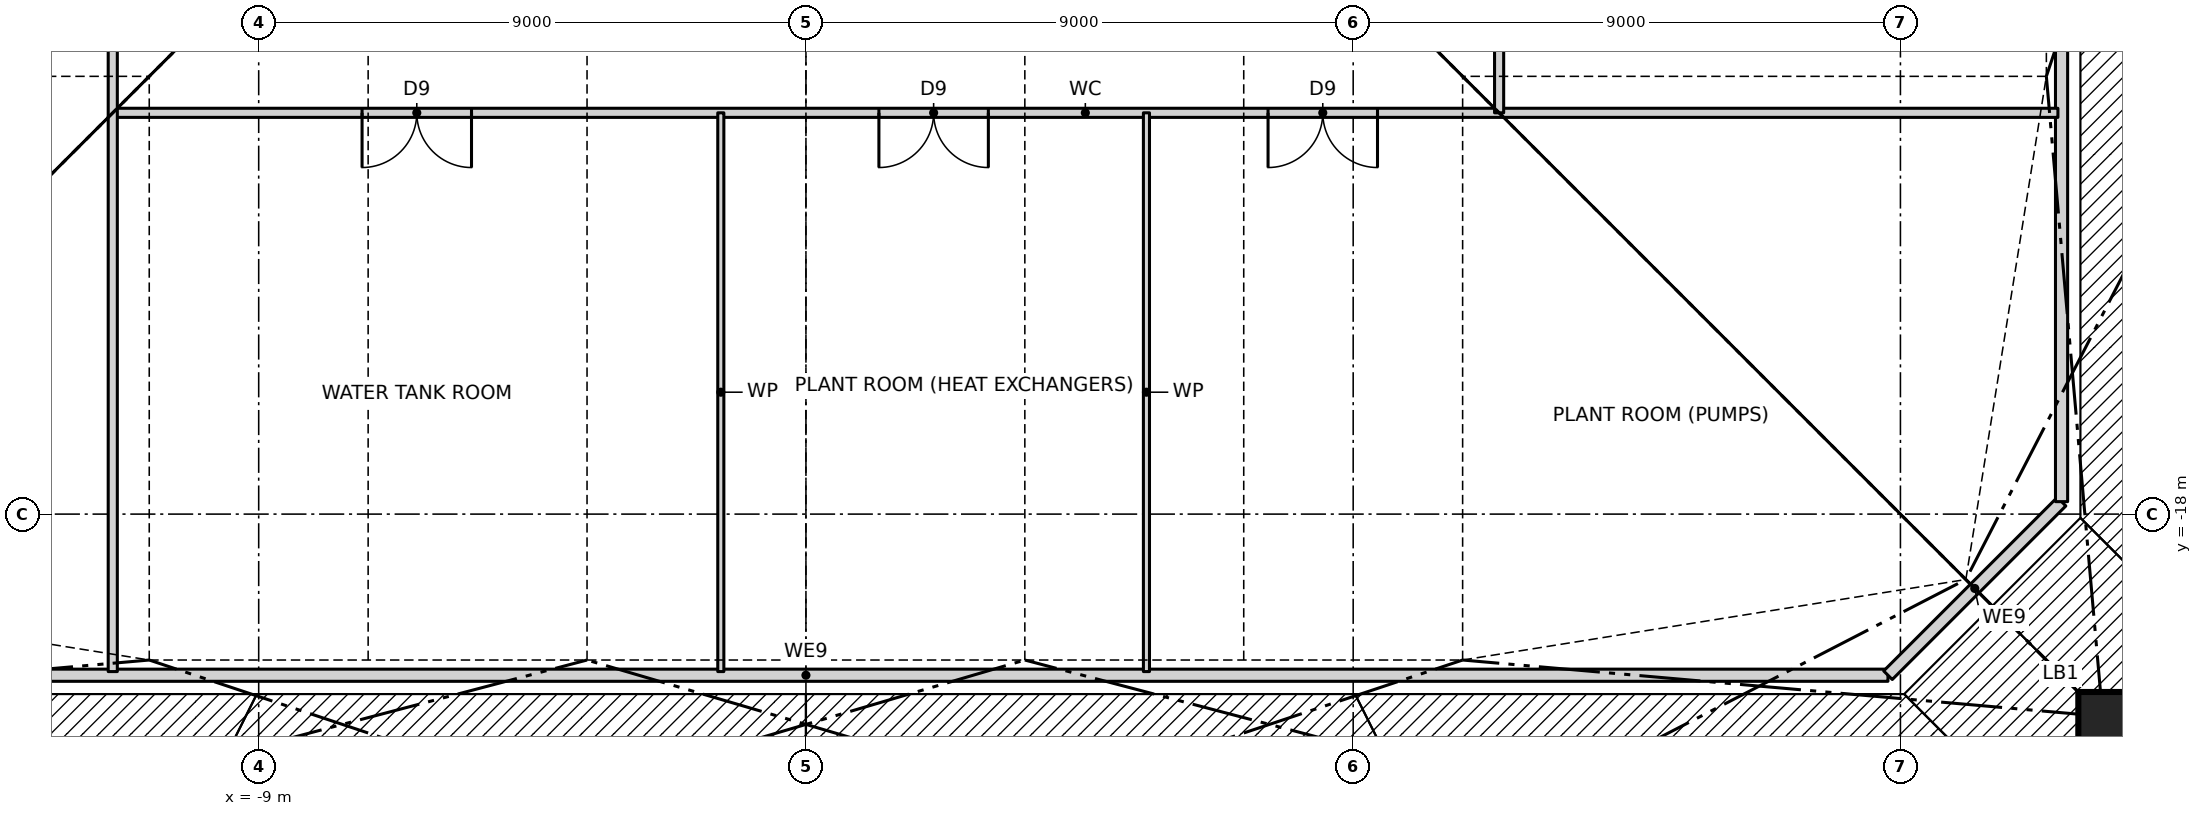
"""IFC4 building model, lengths in metres.
Left out: names, types, materials, properties, quantities, classifications, styles, units other than length and angle.
Written with IfcOpenShell. Run it as: python <this file> out.ifc"""

import sys

from ifc_helpers import new_model, si_unit, direction, frame, frame_2d, origin, origin_2d, place, context, subcontext, project, spatial, rectangle, hollow_rectangle, extrude, clip, halfspace, element, fill, save


model = new_model("IFC4")
c1 = context("Model", 3, precision=1e-05, world=origin(), true_north=direction((0.0, 1.0)))
c2 = subcontext(c1, "Body", "Model", "MODEL_VIEW")
j1 = project(units=[si_unit("LENGTHUNIT", "METRE"), si_unit("PLANEANGLEUNIT", "RADIAN")], contexts=[c1])
p1 = place(None, origin())
s1 = spatial("IfcSite", under=j1, at=p1, CompositionType="ELEMENT")
p2 = place(p1, origin())
s2 = spatial("IfcBuilding", under=s1, at=p2, CompositionType="ELEMENT")
p3 = place(p2, frame((0.0, 0.0, 74.5)))
s3 = spatial("IfcBuildingStorey", under=s2, at=p3, CompositionType="ELEMENT", Elevation=74.5)
p4 = place(p3, frame((-12.15, -22.65, 0.0), z_axis=(0.206127500627, 0.343583115532, 0.91622164142), x_axis=(-0.857517554715, 0.514454704863, 0.0)))
e1 = element("IfcColumn", 1, at=p4, inside=s3, PredefinedType="COLUMN", context=c2, shape_type="Clipping", body=[
    clip(clip(extrude(hollow_rectangle(XDim=0.8, YDim=0.8, WallThickness=0.09, at=origin_2d()), origin(), (0.0, 0.0, 1.0), 6.549), halfspace(frame((0.0, 0.0, 0.0), z_axis=(0.0, -0.400671815572, -0.91622164142), x_axis=(-0.857517554715, -0.471354534126, 0.206127500627)), False)), halfspace(frame((0.0, 2.404, 5.497), z_axis=(0.0, 0.400671815572, 0.91622164142), x_axis=(-0.857517554715, -0.471354534126, 0.206127500627)), False)),
])
p5 = place(p3, frame((-4.05, -22.65, 0.0), z_axis=(0.070044605522, 0.350261033367, 0.934029422311), x_axis=(-0.980584767795, 0.196095673508, 0.0)))
e2 = element("IfcColumn", 2, at=p5, inside=s3, PredefinedType="COLUMN", context=c2, shape_type="Clipping", body=[
    clip(clip(extrude(hollow_rectangle(XDim=0.8, YDim=0.8, WallThickness=0.09, at=origin_2d()), origin(), (0.0, 0.0, 1.0), 6.424), halfspace(frame((0.0, 0.0, 0.0), z_axis=(0.0, -0.357196078167, -0.934029422311), x_axis=(-0.980584767795, -0.183159128644, 0.070044605522)), False)), halfspace(frame((0.0, 2.143, 5.604), z_axis=(0.0, 0.357196078167, 0.934029422311), x_axis=(-0.980584767795, -0.183159128644, 0.070044605522)), False)),
])
p6 = place(p3, frame((4.05, -22.65, 0.0), z_axis=(-0.070044605522, 0.350261033367, 0.934029422311), x_axis=(-0.980584767795, -0.196095673508, 0.0)))
e3 = element("IfcColumn", 3, at=p6, inside=s3, PredefinedType="COLUMN", context=c2, shape_type="Clipping", body=[
    clip(clip(extrude(hollow_rectangle(XDim=0.8, YDim=0.8, WallThickness=0.09, at=origin_2d()), origin(), (0.0, 0.0, 1.0), 6.424), halfspace(frame((0.0, 0.0, 0.0), z_axis=(0.0, -0.357196078167, -0.934029422311), x_axis=(-0.980584767795, 0.183159128644, -0.070044605522)), False)), halfspace(frame((0.0, 2.143, 5.604), z_axis=(0.0, 0.357196078167, 0.934029422311), x_axis=(-0.980584767795, 0.183159128644, -0.070044605522)), False)),
])
p7 = place(p3, frame((12.15, -22.65, 0.0), z_axis=(-0.206127500627, 0.343583115532, 0.91622164142), x_axis=(-0.857517554715, -0.514454704863, 0.0)))
e4 = element("IfcColumn", 4, at=p7, inside=s3, PredefinedType="COLUMN", context=c2, shape_type="Clipping", body=[
    clip(clip(extrude(hollow_rectangle(XDim=0.8, YDim=0.8, WallThickness=0.09, at=origin_2d()), origin(), (0.0, 0.0, 1.0), 6.549), halfspace(frame((0.0, 0.0, 0.0), z_axis=(0.0, -0.400671815572, -0.91622164142), x_axis=(-0.857517554715, 0.471354534126, -0.206127500627)), False)), halfspace(frame((0.0, 2.404, 5.497), z_axis=(0.0, 0.400671815572, 0.91622164142), x_axis=(-0.857517554715, 0.471354534126, -0.206127500627)), False)),
])
p8 = place(p3, frame((21.326, -21.326, 0.0), z_axis=(-0.331294578225, 0.331294578225, 0.883452208599), x_axis=(-0.707106781187, -0.707106781187, 0.0)))
e5 = element("IfcColumn", 5, at=p8, inside=s3, PredefinedType="COLUMN", context=c2, shape_type="Clipping", body=[
    clip(clip(extrude(hollow_rectangle(XDim=0.8, YDim=0.8, WallThickness=0.18, at=origin_2d()), origin(), (0.0, 0.0, 1.0), 6.792), halfspace(frame((0.0, 0.0, 0.0), z_axis=(0.0, -0.468521285666, -0.883452208599), x_axis=(-0.707106781187, 0.624695047554, -0.331294578225)), False)), halfspace(frame((0.0, 2.811, 5.301), z_axis=(0.0, 0.468521285666, 0.883452208599), x_axis=(-0.707106781187, 0.624695047554, -0.331294578225)), False)),
])
p9 = place(p3, frame((22.65, -12.15, 0.0), z_axis=(-0.343583115532, 0.206127500627, 0.91622164142), x_axis=(-0.514454704863, -0.857517554715, 0.0)))
e6 = element("IfcColumn", 6, at=p9, inside=s3, PredefinedType="COLUMN", context=c2, shape_type="Clipping", body=[
    clip(clip(extrude(hollow_rectangle(XDim=0.8, YDim=0.8, WallThickness=0.09, at=origin_2d()), origin(), (0.0, 0.0, 1.0), 6.549), halfspace(frame((0.0, 0.0, 0.0), z_axis=(0.0, -0.400671815572, -0.91622164142), x_axis=(-0.514454704863, 0.785676141527, -0.343583115532)), False)), halfspace(frame((0.0, 2.404, 5.497), z_axis=(0.0, 0.400671815572, 0.91622164142), x_axis=(-0.514454704863, 0.785676141527, -0.343583115532)), False)),
])
p10 = place(p3, frame((-17.795, -20.65, 0.0), z_axis=(0.0, 0.0, 1.0), x_axis=(1.0, 0.0, 0.0)))
e7 = element("IfcWall", 7, at=p10, inside=s3, PredefinedType="PARTITIONING", context=c2, shape_type="SweptSolid", body=[
    extrude(rectangle(XDim=35.59, YDim=0.2, at=frame_2d((17.795, 0.0))), origin(), (0.0, 0.0, 1.0), 5.7),
])
p11 = place(p3, frame((17.795, -20.65, 0.0), z_axis=(0.0, 0.0, 1.0), x_axis=(0.707106781187, 0.707106781187, 0.0)))
e8 = element("IfcWall", 8, at=p11, inside=s3, PredefinedType="PARTITIONING", context=c2, shape_type="SweptSolid", body=[
    extrude(rectangle(XDim=4.038, YDim=0.2, at=frame_2d((2.019, 0.0))), origin(), (0.0, 0.0, 1.0), 5.7),
])
p12 = place(p3, frame((20.65, -17.795, 0.0), z_axis=(0.0, 0.0, 1.0), x_axis=(0.0, 1.0, 0.0)))
e9 = element("IfcWall", 9, at=p12, inside=s3, PredefinedType="PARTITIONING", context=c2, shape_type="SweptSolid", body=[
    extrude(rectangle(XDim=35.59, YDim=0.2, at=frame_2d((17.795, 0.0))), origin(), (0.0, 0.0, 1.0), 5.7),
])
p13 = place(p3, frame((-11.4, -11.4, 0.0), z_axis=(0.0, 0.0, 1.0), x_axis=(1.0, 0.0, 0.0)))
e10 = element("IfcWall", 10, at=p13, inside=s3, PredefinedType="PARTITIONING", context=c2, shape_type="SweptSolid", body=[
    extrude(rectangle(XDim=31.99, YDim=0.15, at=frame_2d((15.995, 0.0))), origin(), (0.0, 0.0, 1.0), 5.77),
])
p14 = place(p13, frame((4.1, 0.0, 0.0)))
e11 = element("IfcOpeningElement", 11, at=p14, cuts=e10, PredefinedType="OPENING", context=c2, shape_type="SweptSolid", body=[
    extrude(rectangle(XDim=1.8, YDim=2.1, at=frame_2d((0.9, 1.05))), frame((0.0, 0.085, 0.0), z_axis=(0.0, -1.0, 0.0), x_axis=(1.0, 0.0, 0.0)), (0.0, 0.0, 1.0), 0.17),
])
p15 = place(p13, frame((12.6, 0.0, 0.0)))
e12 = element("IfcOpeningElement", 12, at=p15, cuts=e10, PredefinedType="OPENING", context=c2, shape_type="SweptSolid", body=[
    extrude(rectangle(XDim=1.8, YDim=2.1, at=frame_2d((0.9, 1.05))), frame((0.0, 0.085, 0.0), z_axis=(0.0, -1.0, 0.0), x_axis=(1.0, 0.0, 0.0)), (0.0, 0.0, 1.0), 0.17),
])
p16 = place(p13, frame((19.0, 0.0, 0.0)))
e13 = element("IfcOpeningElement", 13, at=p16, cuts=e10, PredefinedType="OPENING", context=c2, shape_type="SweptSolid", body=[
    extrude(rectangle(XDim=1.8, YDim=2.1, at=frame_2d((0.9, 1.05))), frame((0.0, 0.085, 0.0), z_axis=(0.0, -1.0, 0.0), x_axis=(1.0, 0.0, 0.0)), (0.0, 0.0, 1.0), 0.17),
])
p17 = place(p3, frame((11.4, -11.4, 0.0), z_axis=(0.0, 0.0, 1.0), x_axis=(0.0, 1.0, 0.0)))
e14 = element("IfcWall", 14, at=p17, inside=s3, PredefinedType="PARTITIONING", context=c2, shape_type="SweptSolid", body=[
    extrude(rectangle(XDim=31.99, YDim=0.15, at=frame_2d((15.995, 0.0))), origin(), (0.0, 0.0, 1.0), 5.77),
])
p18 = place(p17, frame((10.5, 0.0, 0.0)))
e15 = element("IfcOpeningElement", 15, at=p18, cuts=e14, PredefinedType="OPENING", context=c2, shape_type="SweptSolid", body=[
    extrude(rectangle(XDim=1.8, YDim=2.1, at=frame_2d((0.9, 1.05))), frame((0.0, 0.085, 0.0), z_axis=(0.0, -1.0, 0.0), x_axis=(1.0, 0.0, 0.0)), (0.0, 0.0, 1.0), 0.17),
])
for number, where, z_axis, x_axis in (
    (16, (5.6, -20.59, 0.0), (0.0, 0.0, 1.0), (0.0, 1.0, 0.0)),
    (17, (-1.4, -20.59, 0.0), (0.0, 0.0, 1.0), (0.0, 1.0, 0.0)),
):
    element("IfcWall", number, at=place(p3, frame(where, z_axis=z_axis, x_axis=x_axis)), inside=s3, PredefinedType="PARTITIONING", context=c2, shape_type="SweptSolid", body=[
        extrude(rectangle(XDim=9.19, YDim=0.1, at=frame_2d((4.595, 0.0))), origin(), (0.0, 0.0, 1.0), 5.77),
    ])
p19 = place(p3, frame((-11.4, -20.59, 0.0), z_axis=(0.0, 0.0, 1.0), x_axis=(0.0, 1.0, 0.0)))
e18 = element("IfcWall", 18, at=p19, inside=s3, PredefinedType="PARTITIONING", context=c2, shape_type="SweptSolid", body=[
    extrude(rectangle(XDim=31.99, YDim=0.15, at=frame_2d((15.995, 0.0))), origin(), (0.0, 0.0, 1.0), 5.77),
])
p20 = place(p19, frame((19.69, 0.0, 0.0)))
e19 = element("IfcOpeningElement", 19, at=p20, cuts=e18, PredefinedType="OPENING", context=c2, shape_type="SweptSolid", body=[
    extrude(rectangle(XDim=1.8, YDim=2.1, at=frame_2d((0.9, 1.05))), frame((0.0, 0.085, 0.0), z_axis=(0.0, -1.0, 0.0), x_axis=(1.0, 0.0, 0.0)), (0.0, 0.0, 1.0), 0.17),
])
p21 = place(p14, frame((1.8, 0.0, 0.0), z_axis=(0.0, 0.0, 1.0), x_axis=(-1.0, 0.0, 0.0)))
e20 = element("IfcDoor", 20, at=p21, inside=s3, OperationType="DOUBLE_DOOR_SINGLE_SWING", PredefinedType="DOOR", context=c2, shape_type="SweptSolid", body=[
    extrude(rectangle(XDim=1.8, YDim=2.1, at=frame_2d((0.9, 1.05))), frame((0.0, 0.025, 0.0), z_axis=(0.0, -1.0, 0.0), x_axis=(1.0, 0.0, 0.0)), (0.0, 0.0, 1.0), 0.05),
])
fill(e11, e20)
p22 = place(p15, frame((1.8, 0.0, 0.0), z_axis=(0.0, 0.0, 1.0), x_axis=(-1.0, 0.0, 0.0)))
e21 = element("IfcDoor", 21, at=p22, inside=s3, OperationType="DOUBLE_DOOR_SINGLE_SWING", PredefinedType="DOOR", context=c2, shape_type="SweptSolid", body=[
    extrude(rectangle(XDim=1.8, YDim=2.1, at=frame_2d((0.9, 1.05))), frame((0.0, 0.025, 0.0), z_axis=(0.0, -1.0, 0.0), x_axis=(1.0, 0.0, 0.0)), (0.0, 0.0, 1.0), 0.05),
])
fill(e12, e21)
p23 = place(p16, frame((1.8, 0.0, 0.0), z_axis=(0.0, 0.0, 1.0), x_axis=(-1.0, 0.0, 0.0)))
e22 = element("IfcDoor", 22, at=p23, inside=s3, OperationType="DOUBLE_DOOR_SINGLE_SWING", PredefinedType="DOOR", context=c2, shape_type="SweptSolid", body=[
    extrude(rectangle(XDim=1.8, YDim=2.1, at=frame_2d((0.9, 1.05))), frame((0.0, 0.025, 0.0), z_axis=(0.0, -1.0, 0.0), x_axis=(1.0, 0.0, 0.0)), (0.0, 0.0, 1.0), 0.05),
])
fill(e13, e22)
save(model, sys.argv[1])
